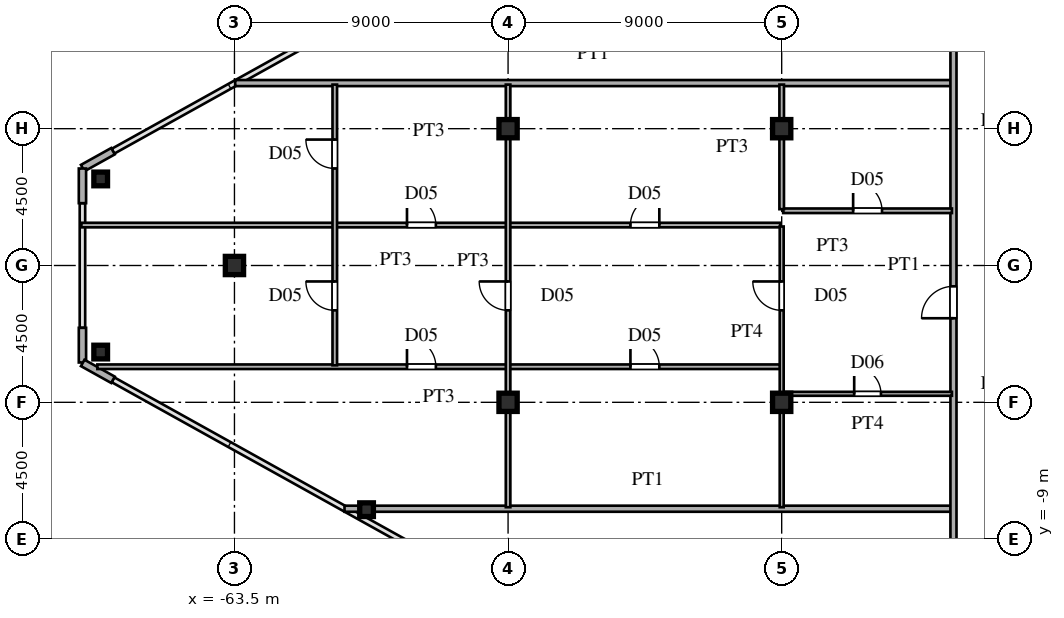
"""IFC4 building model, lengths in metres.
Left out: names, types, materials, properties, quantities, classifications, styles, units other than length and angle.
Written with IfcOpenShell. Run it as: python <this file> out.ifc"""

import sys

from ifc_helpers import new_model, si_unit, direction, frame, frame_2d, origin, origin_2d, place, context, subcontext, project, spatial, rectangle, hollow_rectangle, i_section, extrude, source, transform, mapped, element, fill, save


model = new_model("IFC4")
c1 = context("Model", 3, precision=1e-05, world=origin(), true_north=direction((0.0, 1.0)))
c2 = subcontext(c1, "Body", "Model", "MODEL_VIEW")
j1 = project(units=[si_unit("LENGTHUNIT", "METRE"), si_unit("PLANEANGLEUNIT", "RADIAN")], contexts=[c1])
p1 = place(None, origin())
s1 = spatial("IfcSite", under=j1, at=p1, CompositionType="ELEMENT")
p2 = place(p1, origin())
s2 = spatial("IfcBuilding", under=s1, at=p2, CompositionType="ELEMENT")
p3 = place(p2, frame((0.0, 0.0, 174.3)))
s3 = spatial("IfcBuildingStorey", under=s2, at=p3, CompositionType="ELEMENT", Elevation=174.3)
m1 = source(origin(), c2, "Body", "SweptSolid", [
    extrude(i_section(OverallWidth=0.6, OverallDepth=0.6, WebThickness=0.025, FlangeThickness=0.04, at=origin_2d()), origin(), (0.0, 0.0, 1.0), 3.6),
])
for number, where, z_axis, x_axis in (
    (1, (-45.5, -4.5, 0.0), (0.0, 0.0, 1.0), (1.0, 0.0, 0.0)),
    (2, (-45.5, 4.5, 0.0), (0.0, 0.0, 1.0), (1.0, 0.0, 0.0)),
    (3, (-54.5, -4.5, 0.0), (0.0, 0.0, 1.0), (1.0, 0.0, 0.0)),
    (4, (-54.5, 4.5, 0.0), (0.0, 0.0, 1.0), (1.0, 0.0, 0.0)),
    (5, (-63.5, 0.0, 0.0), (0.0, 0.0, 1.0), (1.0, 0.0, 0.0)),
):
    element("IfcColumn", number, at=place(p3, frame(where, z_axis=z_axis, x_axis=x_axis)), inside=s3, PredefinedType="COLUMN", context=c2, shape_type="MappedRepresentation", body=[
        mapped(m1, transform((0.0, 0.0, 0.0), scale=1.0)),
    ])
m2 = source(origin(), c2, "Body", "SweptSolid", [
    extrude(hollow_rectangle(XDim=0.45, YDim=0.45, WallThickness=0.018, at=origin_2d()), origin(), (0.0, 0.0, 1.0), 3.6),
])
for number, where, z_axis, x_axis in (
    (6, (-67.9, 2.847, 0.0), (0.0, 0.0, 1.0), (1.0, 0.0, 0.0)),
    (7, (-67.9, -2.847, 0.0), (0.0, 0.0, 1.0), (1.0, 0.0, 0.0)),
    (8, (-59.155, -8.031, 0.0), (0.0, 0.0, 1.0), (1.0, 0.0, 0.0)),
):
    element("IfcColumn", number, at=place(p3, frame(where, z_axis=z_axis, x_axis=x_axis)), inside=s3, PredefinedType="COLUMN", context=c2, shape_type="MappedRepresentation", body=[
        mapped(m2, transform((0.0, 0.0, 0.0), scale=1.0)),
    ])
for number, where, z_axis, x_axis in (
    (9, (-67.495, 3.759, 0.0), (0.0, 0.0, 1.0), (-0.874, -0.486, 0.0)),
    (10, (-68.5, 3.19, 0.0), (0.0, 0.0, 1.0), (0.0, -1.0, 0.0)),
    (11, (-68.5, -2.05, 0.0), (0.0, 0.0, 1.0), (0.0, -1.0, 0.0)),
    (12, (-68.491, -3.205, 0.0), (0.0, 0.0, 1.0), (0.874, -0.486, 0.0)),
):
    element("IfcWall", number, at=place(p3, frame(where, z_axis=z_axis, x_axis=x_axis)), inside=s3, PredefinedType="SOLIDWALL", context=c2, shape_type="SweptSolid", body=[
        extrude(rectangle(XDim=1.14, YDim=0.24, at=frame_2d((0.57, 0.0))), origin(), (0.0, 0.0, 1.0), 3.38),
    ])
p4 = place(p3, frame((-59.88, -8.0, 0.0), z_axis=(0.0, 0.0, 1.0), x_axis=(1.0, 0.0, 0.0)))
e13 = element("IfcWall", 13, at=p4, inside=s3, PredefinedType="PARTITIONING", context=c2, shape_type="SweptSolid", body=[
    extrude(rectangle(XDim=19.95, YDim=0.2, at=frame_2d((9.975, 0.0))), origin(), (0.0, 0.0, 1.0), 3.38),
])
p5 = place(p3, frame((-45.45, -4.22, 0.0), z_axis=(0.0, 0.0, 1.0), x_axis=(1.0, 0.0, 0.0)))
e14 = element("IfcWall", 14, at=p5, inside=s3, PredefinedType="PARTITIONING", context=c2, shape_type="SweptSolid", body=[
    extrude(rectangle(XDim=5.55, YDim=0.13, at=frame_2d((2.775, 0.0))), origin(), (0.0, 0.0, 1.0), 3.38),
])
p6 = place(p5, frame((2.335, 0.0, 0.0)))
e15 = element("IfcOpeningElement", 15, at=p6, cuts=e14, PredefinedType="OPENING", context=c2, shape_type="SweptSolid", body=[
    extrude(rectangle(XDim=0.88, YDim=2.1, at=frame_2d((0.44, 1.05))), frame((0.0, 0.075, 0.0), z_axis=(0.0, -1.0, 0.0), x_axis=(1.0, 0.0, 0.0)), (0.0, 0.0, 1.0), 0.15),
])
p7 = place(p3, frame((-68.009, -3.33, 0.0), z_axis=(0.0, 0.0, 1.0), x_axis=(1.0, 0.0, 0.0)))
e16 = element("IfcWall", 16, at=p7, inside=s3, PredefinedType="PARTITIONING", context=c2, shape_type="SweptSolid", body=[
    extrude(rectangle(XDim=22.459, YDim=0.15, at=frame_2d((11.229, 0.0))), origin(), (0.0, 0.0, 1.0), 3.38),
])
p8 = place(p7, frame((17.534, 0.0, 0.0)))
e17 = element("IfcOpeningElement", 17, at=p8, cuts=e16, PredefinedType="OPENING", context=c2, shape_type="SweptSolid", body=[
    extrude(rectangle(XDim=0.95, YDim=2.15, at=frame_2d((0.475, 1.075))), frame((0.0, 0.085, 0.0), z_axis=(0.0, -1.0, 0.0), x_axis=(1.0, 0.0, 0.0)), (0.0, 0.0, 1.0), 0.17),
])
p9 = place(p7, frame((10.184, 0.0, 0.0)))
e18 = element("IfcOpeningElement", 18, at=p9, cuts=e16, PredefinedType="OPENING", context=c2, shape_type="SweptSolid", body=[
    extrude(rectangle(XDim=0.95, YDim=2.15, at=frame_2d((0.475, 1.075))), frame((0.0, 0.085, 0.0), z_axis=(0.0, -1.0, 0.0), x_axis=(1.0, 0.0, 0.0)), (0.0, 0.0, 1.0), 0.17),
])
p10 = place(p3, frame((-68.535, 1.33, 0.0), z_axis=(0.0, 0.0, 1.0), x_axis=(1.0, 0.0, 0.0)))
e19 = element("IfcWall", 19, at=p10, inside=s3, PredefinedType="PARTITIONING", context=c2, shape_type="SweptSolid", body=[
    extrude(rectangle(XDim=22.985, YDim=0.15, at=frame_2d((11.492, 0.0))), origin(), (0.0, 0.0, 1.0), 3.38),
])
p11 = place(p10, frame((18.06, 0.0, 0.0)))
e20 = element("IfcOpeningElement", 20, at=p11, cuts=e19, PredefinedType="OPENING", context=c2, shape_type="SweptSolid", body=[
    extrude(rectangle(XDim=0.95, YDim=2.15, at=frame_2d((0.475, 1.075))), frame((0.0, 0.085, 0.0), z_axis=(0.0, -1.0, 0.0), x_axis=(1.0, 0.0, 0.0)), (0.0, 0.0, 1.0), 0.17),
])
p12 = place(p10, frame((10.71, 0.0, 0.0)))
e21 = element("IfcOpeningElement", 21, at=p12, cuts=e19, PredefinedType="OPENING", context=c2, shape_type="SweptSolid", body=[
    extrude(rectangle(XDim=0.95, YDim=2.15, at=frame_2d((0.475, 1.075))), frame((0.0, 0.085, 0.0), z_axis=(0.0, -1.0, 0.0), x_axis=(1.0, 0.0, 0.0)), (0.0, 0.0, 1.0), 0.17),
])
p13 = place(p3, frame((-45.45, 1.8, 0.0), z_axis=(0.0, 0.0, 1.0), x_axis=(1.0, 0.0, 0.0)))
e22 = element("IfcWall", 22, at=p13, inside=s3, PredefinedType="PARTITIONING", context=c2, shape_type="SweptSolid", body=[
    extrude(rectangle(XDim=5.55, YDim=0.15, at=frame_2d((2.775, 0.0))), origin(), (0.0, 0.0, 1.0), 3.38),
])
p14 = place(p13, frame((2.3, 0.0, 0.0)))
e23 = element("IfcOpeningElement", 23, at=p14, cuts=e22, PredefinedType="OPENING", context=c2, shape_type="SweptSolid", body=[
    extrude(rectangle(XDim=0.95, YDim=2.15, at=frame_2d((0.475, 1.075))), frame((0.0, 0.085, 0.0), z_axis=(0.0, -1.0, 0.0), x_axis=(1.0, 0.0, 0.0)), (0.0, 0.0, 1.0), 0.17),
])
p15 = place(p3, frame((-63.476, 6.0, 0.0), z_axis=(0.0, 0.0, 1.0), x_axis=(1.0, 0.0, 0.0)))
e24 = element("IfcWall", 24, at=p15, inside=s3, PredefinedType="PARTITIONING", context=c2, shape_type="SweptSolid", body=[
    extrude(rectangle(XDim=23.546, YDim=0.2, at=frame_2d((11.773, 0.0))), origin(), (0.0, 0.0, 1.0), 3.38),
])
p16 = place(p3, frame((-60.2, -3.283, 0.0), z_axis=(0.0, 0.0, 1.0), x_axis=(0.0, 1.0, 0.0)))
e25 = element("IfcWall", 25, at=p16, inside=s3, PredefinedType="PARTITIONING", context=c2, shape_type="SweptSolid", body=[
    extrude(rectangle(XDim=9.233, YDim=0.15, at=frame_2d((4.616, 0.0))), origin(), (0.0, 0.0, 1.0), 3.38),
])
p17 = place(p16, frame((1.808, 0.0, 0.0)))
e26 = element("IfcOpeningElement", 26, at=p17, cuts=e25, PredefinedType="OPENING", context=c2, shape_type="SweptSolid", body=[
    extrude(rectangle(XDim=0.95, YDim=2.15, at=frame_2d((0.475, 1.075))), frame((0.0, 0.085, 0.0), z_axis=(0.0, -1.0, 0.0), x_axis=(1.0, 0.0, 0.0)), (0.0, 0.0, 1.0), 0.17),
])
p18 = place(p16, frame((6.475, 0.0, 0.0)))
e27 = element("IfcOpeningElement", 27, at=p18, cuts=e25, PredefinedType="OPENING", context=c2, shape_type="SweptSolid", body=[
    extrude(rectangle(XDim=0.95, YDim=2.15, at=frame_2d((0.475, 1.075))), frame((0.0, 0.085, 0.0), z_axis=(0.0, -1.0, 0.0), x_axis=(1.0, 0.0, 0.0)), (0.0, 0.0, 1.0), 0.17),
])
p19 = place(p3, frame((-54.5, -7.95, 0.0), z_axis=(0.0, 0.0, 1.0), x_axis=(0.0, 1.0, 0.0)))
e28 = element("IfcWall", 28, at=p19, inside=s3, PredefinedType="PARTITIONING", context=c2, shape_type="SweptSolid", body=[
    extrude(rectangle(XDim=13.9, YDim=0.15, at=frame_2d((6.95, 0.0))), origin(), (0.0, 0.0, 1.0), 2.78),
])
p20 = place(p19, frame((6.475, 0.0, 0.0)))
e29 = element("IfcOpeningElement", 29, at=p20, cuts=e28, PredefinedType="OPENING", context=c2, shape_type="SweptSolid", body=[
    extrude(rectangle(XDim=0.95, YDim=2.15, at=frame_2d((0.475, 1.075))), frame((0.0, 0.085, 0.0), z_axis=(0.0, -1.0, 0.0), x_axis=(1.0, 0.0, 0.0)), (0.0, 0.0, 1.0), 0.17),
])
p21 = place(p3, frame((-45.5, -7.95, 0.0), z_axis=(0.0, 0.0, 1.0), x_axis=(0.0, 1.0, 0.0)))
e30 = element("IfcWall", 30, at=p21, inside=s3, PredefinedType="PARTITIONING", context=c2, shape_type="SweptSolid", body=[
    extrude(rectangle(XDim=9.233, YDim=0.13, at=frame_2d((4.616, 0.0))), origin(), (0.0, 0.0, 1.0), 2.78),
])
p22 = place(p21, frame((6.475, 0.0, 0.0)))
e31 = element("IfcOpeningElement", 31, at=p22, cuts=e30, PredefinedType="OPENING", context=c2, shape_type="SweptSolid", body=[
    extrude(rectangle(XDim=0.95, YDim=2.15, at=frame_2d((0.475, 1.075))), frame((0.0, 0.075, 0.0), z_axis=(0.0, -1.0, 0.0), x_axis=(1.0, 0.0, 0.0)), (0.0, 0.0, 1.0), 0.15),
])
p23 = place(p3, frame((-45.5, 1.852, 0.0), z_axis=(0.0, 0.0, 1.0), x_axis=(0.0, 1.0, 0.0)))
e32 = element("IfcWall", 32, at=p23, inside=s3, PredefinedType="PARTITIONING", context=c2, shape_type="SweptSolid", body=[
    extrude(rectangle(XDim=4.098, YDim=0.15, at=frame_2d((2.049, 0.0))), origin(), (0.0, 0.0, 1.0), 2.78),
])
p24 = place(p3, frame((-39.85, -15.715, 0.0), z_axis=(0.0, 0.0, 1.0), x_axis=(0.0, 1.0, 0.0)))
e33 = element("IfcWall", 33, at=p24, inside=s3, PredefinedType="PARTITIONING", context=c2, shape_type="SweptSolid", body=[
    extrude(rectangle(XDim=31.43, YDim=0.2, at=frame_2d((15.715, 0.0))), origin(), (0.0, 0.0, 1.0), 3.38),
])
p25 = place(p24, frame((3.29, 0.0, 0.0)))
e34 = element("IfcOpeningElement", 34, at=p25, cuts=e33, PredefinedType="OPENING", context=c2, shape_type="SweptSolid", body=[
    extrude(rectangle(XDim=1.05, YDim=2.25, at=frame_2d((0.525, 1.125))), frame((0.0, 0.11, 0.0), z_axis=(0.0, -1.0, 0.0), x_axis=(1.0, 0.0, 0.0)), (0.0, 0.0, 1.0), 0.22),
])
p26 = place(p24, frame((13.98, 0.0, 0.0)))
e35 = element("IfcOpeningElement", 35, at=p26, cuts=e33, PredefinedType="OPENING", context=c2, shape_type="SweptSolid", body=[
    extrude(rectangle(XDim=1.05, YDim=2.25, at=frame_2d((0.525, 1.125))), frame((0.0, 0.11, 0.0), z_axis=(0.0, -1.0, 0.0), x_axis=(1.0, 0.0, 0.0)), (0.0, 0.0, 1.0), 0.22),
])
p27 = place(p24, frame((26.09, 0.0, 0.0)))
e36 = element("IfcOpeningElement", 36, at=p27, cuts=e33, PredefinedType="OPENING", context=c2, shape_type="SweptSolid", body=[
    extrude(rectangle(XDim=1.05, YDim=2.25, at=frame_2d((0.525, 1.125))), frame((0.0, 0.11, 0.0), z_axis=(0.0, -1.0, 0.0), x_axis=(1.0, 0.0, 0.0)), (0.0, 0.0, 1.0), 0.22),
])
m3 = source(origin(), c2, "Body", "SweptSolid", [
    extrude(rectangle(XDim=0.88, YDim=2.1, at=frame_2d((0.44, 1.05))), frame((0.0, 0.025, 0.0), z_axis=(0.0, -1.0, 0.0), x_axis=(1.0, 0.0, 0.0)), (0.0, 0.0, 1.0), 0.05),
])
p28 = place(p6, origin())
e37 = element("IfcDoor", 37, at=p28, inside=s3, OperationType="SINGLE_SWING_LEFT", PredefinedType="DOOR", context=c2, shape_type="MappedRepresentation", body=[
    mapped(m3, transform((0.0, 0.0, 0.0), scale=1.0)),
])
fill(e15, e37)
m4 = source(origin(), c2, "Body", "SweptSolid", [
    extrude(rectangle(XDim=0.95, YDim=2.15, at=frame_2d((0.475, 1.075))), frame((0.0, 0.025, 0.0), z_axis=(0.0, -1.0, 0.0), x_axis=(1.0, 0.0, 0.0)), (0.0, 0.0, 1.0), 0.05),
])
p29 = place(p8, origin())
e38 = element("IfcDoor", 38, at=p29, inside=s3, OperationType="SINGLE_SWING_LEFT", PredefinedType="DOOR", context=c2, shape_type="MappedRepresentation", body=[
    mapped(m4, transform((0.0, 0.0, 0.0), scale=1.0)),
])
fill(e17, e38)
p30 = place(p9, origin())
e39 = element("IfcDoor", 39, at=p30, inside=s3, OperationType="SINGLE_SWING_LEFT", PredefinedType="DOOR", context=c2, shape_type="MappedRepresentation", body=[
    mapped(m4, transform((0.0, 0.0, 0.0), scale=1.0)),
])
fill(e18, e39)
p31 = place(p11, origin())
e40 = element("IfcDoor", 40, at=p31, inside=s3, OperationType="SINGLE_SWING_RIGHT", PredefinedType="DOOR", context=c2, shape_type="MappedRepresentation", body=[
    mapped(m4, transform((0.0, 0.0, 0.0), scale=1.0)),
])
fill(e20, e40)
p32 = place(p12, origin())
e41 = element("IfcDoor", 41, at=p32, inside=s3, OperationType="SINGLE_SWING_LEFT", PredefinedType="DOOR", context=c2, shape_type="MappedRepresentation", body=[
    mapped(m4, transform((0.0, 0.0, 0.0), scale=1.0)),
])
fill(e21, e41)
p33 = place(p14, origin())
e42 = element("IfcDoor", 42, at=p33, inside=s3, OperationType="SINGLE_SWING_LEFT", PredefinedType="DOOR", context=c2, shape_type="MappedRepresentation", body=[
    mapped(m4, transform((0.0, 0.0, 0.0), scale=1.0)),
])
fill(e23, e42)
p34 = place(p17, origin())
e43 = element("IfcDoor", 43, at=p34, inside=s3, OperationType="SINGLE_SWING_RIGHT", PredefinedType="DOOR", context=c2, shape_type="MappedRepresentation", body=[
    mapped(m4, transform((0.0, 0.0, 0.0), scale=1.0)),
])
fill(e26, e43)
p35 = place(p18, origin())
e44 = element("IfcDoor", 44, at=p35, inside=s3, OperationType="SINGLE_SWING_RIGHT", PredefinedType="DOOR", context=c2, shape_type="MappedRepresentation", body=[
    mapped(m4, transform((0.0, 0.0, 0.0), scale=1.0)),
])
fill(e27, e44)
p36 = place(p20, origin())
e45 = element("IfcDoor", 45, at=p36, inside=s3, OperationType="SINGLE_SWING_RIGHT", PredefinedType="DOOR", context=c2, shape_type="MappedRepresentation", body=[
    mapped(m4, transform((0.0, 0.0, 0.0), scale=1.0)),
])
fill(e29, e45)
p37 = place(p22, origin())
e46 = element("IfcDoor", 46, at=p37, inside=s3, OperationType="SINGLE_SWING_RIGHT", PredefinedType="DOOR", context=c2, shape_type="MappedRepresentation", body=[
    mapped(m4, transform((0.0, 0.0, 0.0), scale=1.0)),
])
fill(e31, e46)
m5 = source(origin(), c2, "Body", "SweptSolid", [
    extrude(rectangle(XDim=1.05, YDim=2.25, at=frame_2d((0.525, 1.125))), frame((0.0, 0.025, 0.0), z_axis=(0.0, -1.0, 0.0), x_axis=(1.0, 0.0, 0.0)), (0.0, 0.0, 1.0), 0.05),
])
p38 = place(p26, origin())
e47 = element("IfcDoor", 47, at=p38, inside=s3, OperationType="SINGLE_SWING_LEFT", PredefinedType="DOOR", context=c2, shape_type="MappedRepresentation", body=[
    mapped(m5, transform((0.0, 0.0, 0.0), scale=1.0)),
])
fill(e35, e47)
save(model, sys.argv[1])
